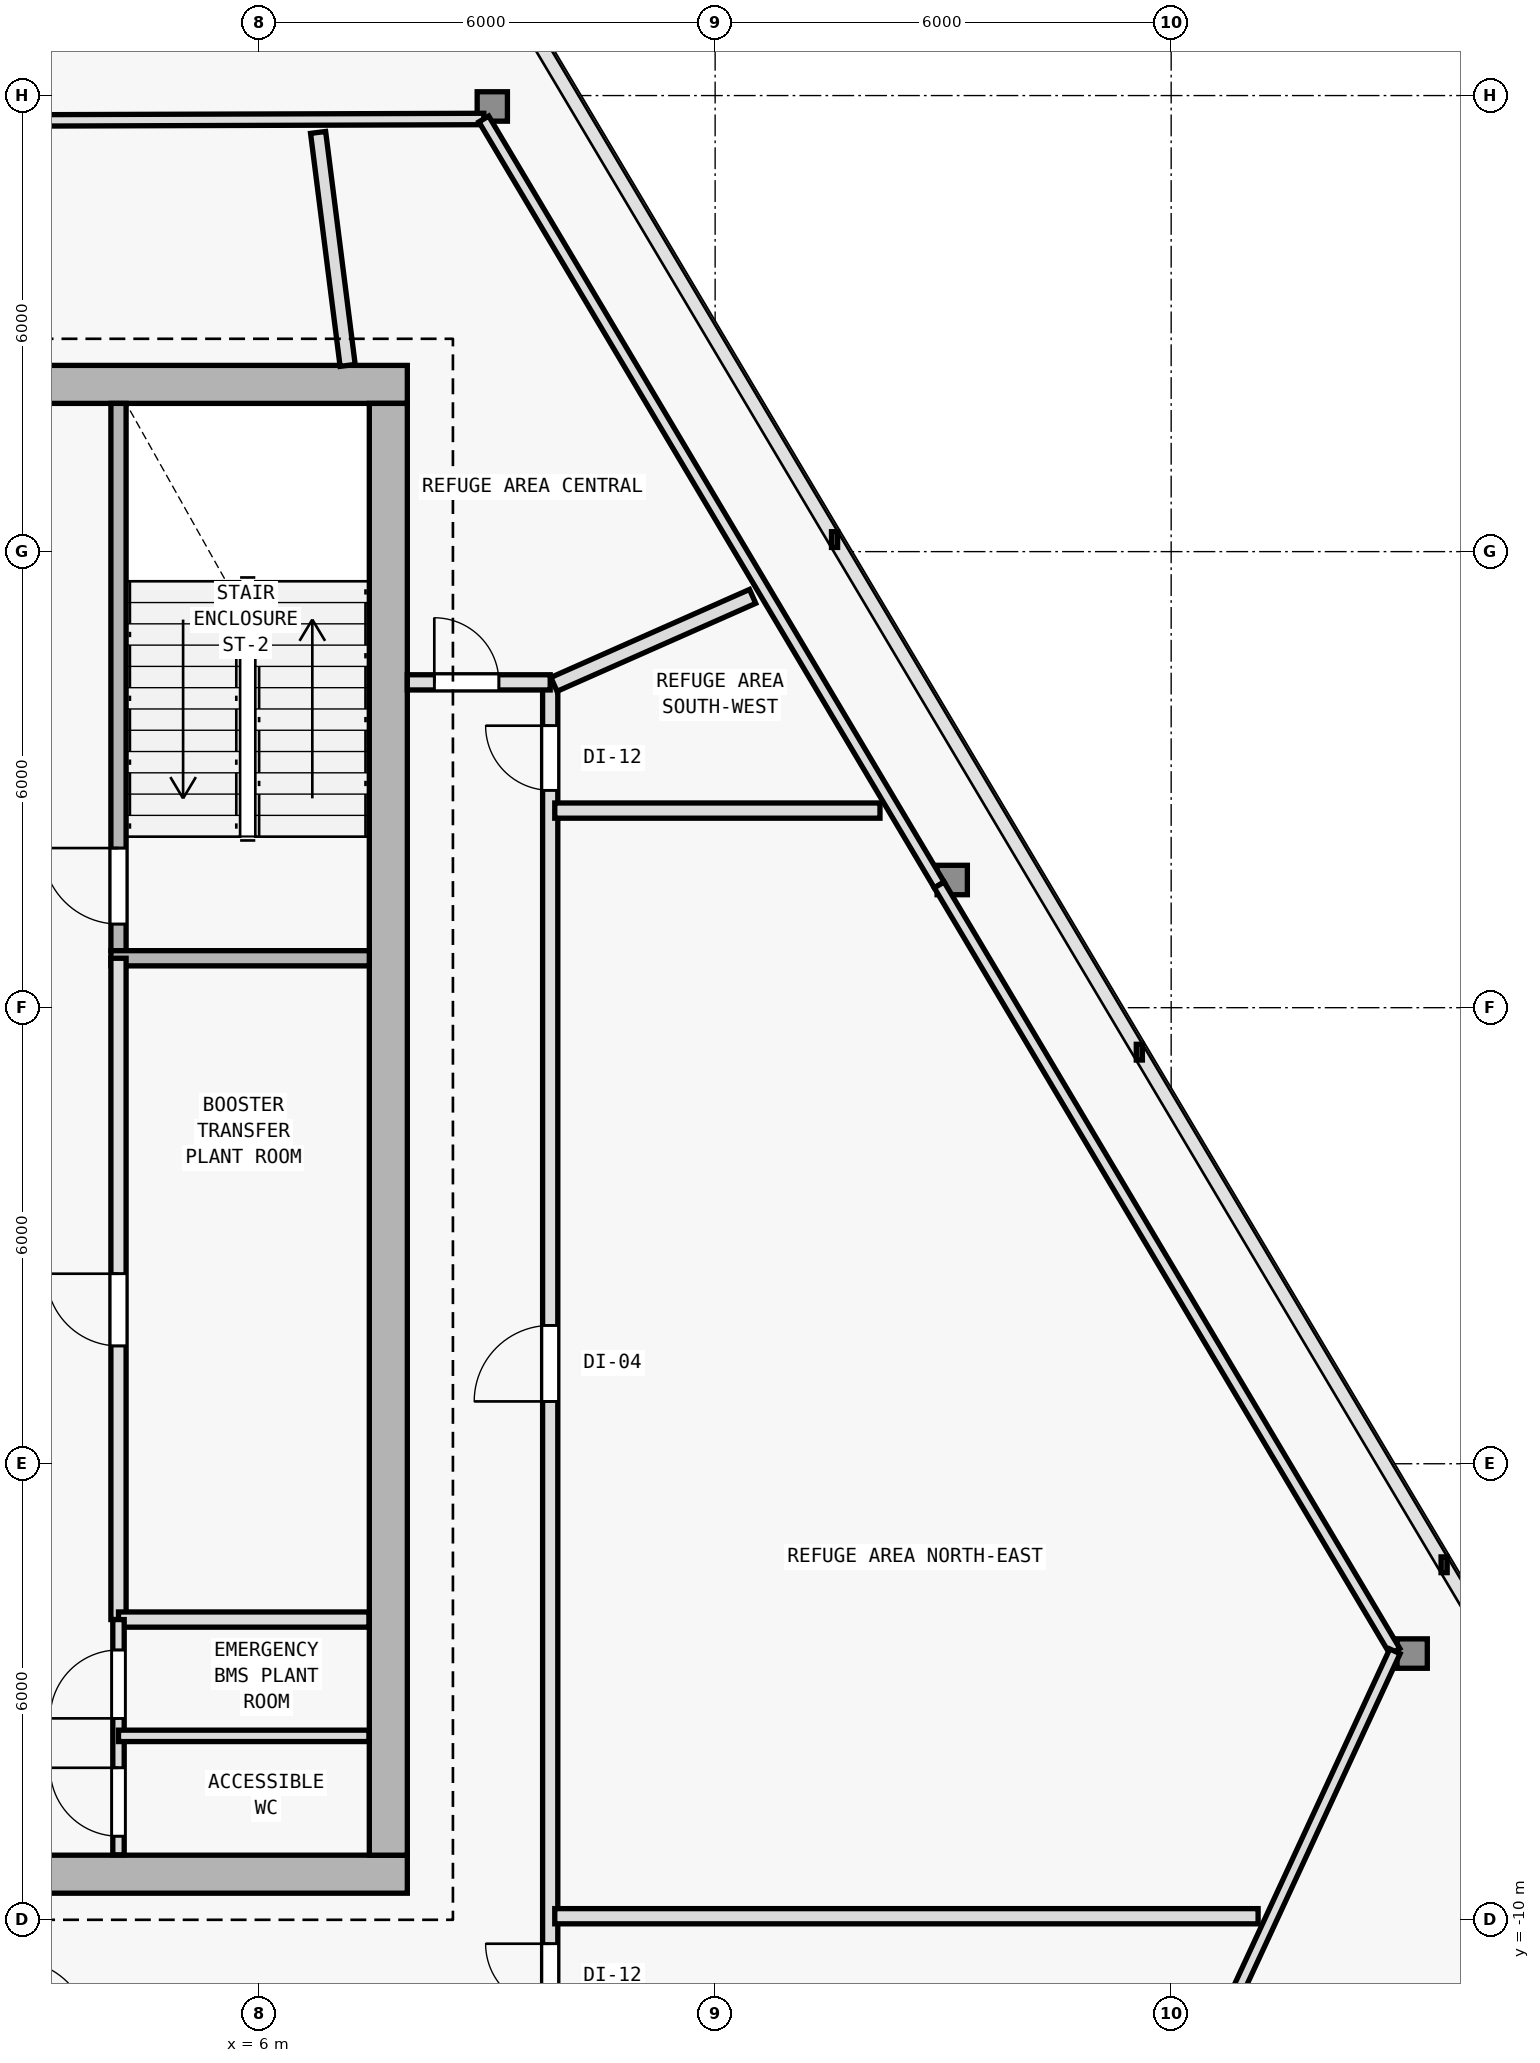
"""IFC4 building model, lengths in metres.
Left out: names, types, materials, properties, quantities, classifications, styles, units other than length and angle.
Written with IfcOpenShell. Run it as: python <this file> out.ifc"""

import sys

from ifc_helpers import new_model, si_unit, direction, frame, frame_2d, origin, origin_2d, place, context, subcontext, project, spatial, rectangle, i_section, extrude, element, fill, save


model = new_model("IFC4")
c1 = context("Model", 3, precision=1e-05, world=origin(), true_north=direction((0.0, 1.0)))
c2 = subcontext(c1, "Body", "Model", "MODEL_VIEW")
j1 = project(units=[si_unit("LENGTHUNIT", "METRE"), si_unit("PLANEANGLEUNIT", "RADIAN")], contexts=[c1])
p1 = place(None, origin())
s1 = spatial("IfcSite", under=j1, at=p1, CompositionType="ELEMENT")
p2 = place(p1, origin())
s2 = spatial("IfcBuilding", under=s1, at=p2, CompositionType="ELEMENT")
p3 = place(p2, frame((0.0, 0.0, 185.4)))
s3 = spatial("IfcBuildingStorey", under=s2, at=p3, CompositionType="ELEMENT", Elevation=185.4)
for number, where, z_axis, x_axis in (
    (1, (7.7, -9.4, 0.0), (0.0, 0.0, 1.0), (1.0, 0.0, 0.0)),
    (2, (7.7, 10.2, 0.0), (0.0, 0.0, 1.0), (1.0, 0.0, 0.0)),
    (3, (7.7, 0.4, 0.0), (0.0, 0.0, 1.0), (1.0, 0.0, 0.0)),
):
    element("IfcColumn", number, at=place(p3, frame(where, z_axis=z_axis, x_axis=x_axis)), inside=s3, PredefinedType="COLUMN", context=c2, shape_type="SweptSolid", body=[
        extrude(i_section(OverallWidth=0.404, OverallDepth=0.407, WebThickness=0.017, FlangeThickness=0.028, FilletRadius=0.015, at=origin_2d()), origin(), (0.0, 0.0, 1.0), 4.8),
    ])
p4 = place(p3, frame((21.171, -6.497, 0.006), z_axis=(-0.019518593425, 0.016206038405, 0.999678142619), x_axis=(-0.638800249892, -0.769372628015, 0.0)))
e4 = element("IfcColumn", 4, at=p4, inside=s3, PredefinedType="COLUMN", context=c2, shape_type="SweptSolid", body=[
    extrude(i_section(OverallWidth=0.398, OverallDepth=0.387, WebThickness=0.013, FlangeThickness=0.022, FilletRadius=0.015, at=origin_2d()), origin(), (0.0, 0.0, 1.0), 4.791),
])
p5 = place(p3, frame((15.12, 3.68, 0.006), z_axis=(-0.014170320574, 0.007136132663, 0.999874130891), x_axis=(-0.449781931574, -0.893138406984, 0.0)))
e5 = element("IfcColumn", 5, at=p5, inside=s3, PredefinedType="COLUMN", context=c2, shape_type="SweptSolid", body=[
    extrude(i_section(OverallWidth=0.398, OverallDepth=0.387, WebThickness=0.013, FlangeThickness=0.022, FilletRadius=0.015, at=origin_2d()), origin(), (0.0, 0.0, 1.0), 4.79),
])
p6 = place(p3, frame((9.068, 13.857, 0.006), z_axis=(-0.008818971646, -0.001937115159, 0.999959235831), x_axis=(0.214538664031, -0.976715496773, 0.0)))
e6 = element("IfcColumn", 6, at=p6, inside=s3, PredefinedType="COLUMN", context=c2, shape_type="SweptSolid", body=[
    extrude(i_section(OverallWidth=0.398, OverallDepth=0.387, WebThickness=0.013, FlangeThickness=0.022, FilletRadius=0.015, at=origin_2d()), origin(), (0.0, 0.0, 1.0), 4.789),
])
p7 = place(p3, frame((-7.95, -9.4, 0.0), z_axis=(0.0, 0.0, 1.0), x_axis=(1.0, 0.0, 0.0)))
e7 = element("IfcWall", 7, at=p7, inside=s3, PredefinedType="SHEAR", context=c2, shape_type="SweptSolid", body=[
    extrude(rectangle(XDim=15.9, YDim=0.5, at=frame_2d((7.95, 0.0))), origin(), (0.0, 0.0, 1.0), 4.5),
])
p8 = place(p7, frame((9.6, 0.0, 0.0)))
e8 = element("IfcOpeningElement", 8, at=p8, cuts=e7, PredefinedType="OPENING", context=c2, shape_type="SweptSolid", body=[
    extrude(rectangle(XDim=1.5, YDim=2.2, at=frame_2d((0.75, 1.1))), frame((0.0, 0.26, 0.0), z_axis=(0.0, -1.0, 0.0), x_axis=(1.0, 0.0, 0.0)), (0.0, 0.0, 1.0), 0.52),
])
p9 = place(p3, frame((7.95, 10.2, 0.0), z_axis=(0.0, 0.0, 1.0), x_axis=(-1.0, 0.0, 0.0)))
e9 = element("IfcWall", 9, at=p9, inside=s3, PredefinedType="SHEAR", context=c2, shape_type="SweptSolid", body=[
    extrude(rectangle(XDim=15.9, YDim=0.5, at=frame_2d((7.95, 0.0))), origin(), (0.0, 0.0, 1.0), 4.5),
])
p10 = place(p3, frame((7.7, 9.95, 0.0), z_axis=(0.0, 0.0, 1.0), x_axis=(0.0, -1.0, 0.0)))
e10 = element("IfcWall", 10, at=p10, inside=s3, PredefinedType="SHEAR", context=c2, shape_type="SweptSolid", body=[
    extrude(rectangle(XDim=19.1, YDim=0.5, at=frame_2d((9.55, 0.0))), origin(), (0.0, 0.0, 1.0), 4.5),
])
p11 = place(p3, frame((4.15, 2.75, 0.0), z_axis=(0.0, 0.0, 1.0), x_axis=(0.0, 1.0, 0.0)))
e11 = element("IfcWall", 11, at=p11, inside=s3, PredefinedType="SOLIDWALL", context=c2, shape_type="SweptSolid", body=[
    extrude(rectangle(XDim=7.2, YDim=0.2, at=frame_2d((3.6, 0.0))), origin(), (0.0, 0.0, 1.0), 4.5),
])
p12 = place(p11, frame((0.35, 0.0, 0.0)))
e12 = element("IfcOpeningElement", 12, at=p12, cuts=e11, PredefinedType="OPENING", context=c2, shape_type="SweptSolid", body=[
    extrude(rectangle(XDim=1.0, YDim=2.15, at=frame_2d((0.5, 1.075))), frame((0.0, 0.11, 0.0), z_axis=(0.0, -1.0, 0.0), x_axis=(1.0, 0.0, 0.0)), (0.0, 0.0, 1.0), 0.22),
])
p13 = place(p3, frame((4.05, 2.65, 0.0), z_axis=(0.0, 0.0, 1.0), x_axis=(1.0, 0.0, 0.0)))
e13 = element("IfcWall", 13, at=p13, inside=s3, PredefinedType="SOLIDWALL", context=c2, shape_type="SweptSolid", body=[
    extrude(rectangle(XDim=3.4, YDim=0.2, at=frame_2d((1.7, 0.0))), origin(), (0.0, 0.0, 1.0), 4.5),
])
p14 = place(p3, frame((4.15, -6.05, 0.0), z_axis=(0.0, 0.0, 1.0), x_axis=(0.0, 1.0, 0.0)))
e14 = element("IfcWall", 14, at=p14, inside=s3, PredefinedType="SOLIDWALL", context=c2, shape_type="SweptSolid", body=[
    extrude(rectangle(XDim=8.7, YDim=0.2, at=frame_2d((4.35, 0.0))), origin(), (0.0, 0.0, 1.0), 4.5),
])
p15 = place(p14, frame((3.6, 0.0, 0.0)))
e15 = element("IfcOpeningElement", 15, at=p15, cuts=e14, PredefinedType="OPENING", context=c2, shape_type="SweptSolid", body=[
    extrude(rectangle(XDim=0.95, YDim=2.1, at=frame_2d((0.475, 1.05))), frame((0.0, 0.11, 0.0), z_axis=(0.0, -1.0, 0.0), x_axis=(1.0, 0.0, 0.0)), (0.0, 0.0, 1.0), 0.22),
])
p16 = place(p3, frame((4.15, -6.05, 0.0), z_axis=(0.0, 0.0, 1.0), x_axis=(1.0, 0.0, 0.0)))
e16 = element("IfcWall", 16, at=p16, inside=s3, PredefinedType="SOLIDWALL", context=c2, shape_type="SweptSolid", body=[
    extrude(rectangle(XDim=3.295, YDim=0.2, at=frame_2d((1.647, 0.0))), origin(), (0.0, 0.0, 1.0), 4.5),
])
p17 = place(p3, frame((4.15, -9.145, 0.0), z_axis=(0.0, 0.0, 1.0), x_axis=(0.0, 1.0, 0.0)))
e17 = element("IfcWall", 17, at=p17, inside=s3, PredefinedType="PARTITIONING", context=c2, shape_type="SweptSolid", body=[
    extrude(rectangle(XDim=3.095, YDim=0.15, at=frame_2d((1.547, 0.0))), origin(), (0.0, 0.0, 1.0), 4.5),
])
p18 = place(p17, frame((0.245, 0.0, 0.0)))
e18 = element("IfcOpeningElement", 18, at=p18, cuts=e17, PredefinedType="OPENING", context=c2, shape_type="SweptSolid", body=[
    extrude(rectangle(XDim=0.9, YDim=2.1, at=frame_2d((0.45, 1.05))), frame((0.0, 0.085, 0.0), z_axis=(0.0, -1.0, 0.0), x_axis=(1.0, 0.0, 0.0)), (0.0, 0.0, 1.0), 0.17),
])
p19 = place(p17, frame((1.795, 0.0, 0.0)))
e19 = element("IfcOpeningElement", 19, at=p19, cuts=e17, PredefinedType="OPENING", context=c2, shape_type="SweptSolid", body=[
    extrude(rectangle(XDim=0.9, YDim=2.1, at=frame_2d((0.45, 1.05))), frame((0.0, 0.085, 0.0), z_axis=(0.0, -1.0, 0.0), x_axis=(1.0, 0.0, 0.0)), (0.0, 0.0, 1.0), 0.17),
])
p20 = place(p3, frame((4.15, -7.58, 0.0), z_axis=(0.0, 0.0, 1.0), x_axis=(1.0, 0.0, 0.0)))
e20 = element("IfcWall", 20, at=p20, inside=s3, PredefinedType="PARTITIONING", context=c2, shape_type="SweptSolid", body=[
    extrude(rectangle(XDim=3.295, YDim=0.15, at=frame_2d((1.647, 0.0))), origin(), (0.0, 0.0, 1.0), 4.5),
])
p21 = place(p3, frame((-6.529, 13.644, 0.0), z_axis=(0.0, 0.0, 1.0), x_axis=(0.999995127533, 0.003121683751, 0.0)))
e21 = element("IfcWall", 21, at=p21, inside=s3, PredefinedType="PARTITIONING", context=c2, shape_type="SweptSolid", body=[
    extrude(rectangle(XDim=15.485, YDim=0.15, at=frame_2d((7.743, 0.0))), origin(), (0.0, 0.0, 1.0), 4.085),
])
p22 = place(p3, frame((8.956, 13.692, 0.0), z_axis=(0.0, 0.0, 1.0), x_axis=(0.511092441112, -0.859525751004, 0.0)))
e22 = element("IfcWall", 22, at=p22, inside=s3, PredefinedType="PARTITIONING", context=c2, shape_type="SweptSolid", body=[
    extrude(rectangle(XDim=11.724, YDim=0.15, at=frame_2d((5.862, 0.0))), origin(), (0.0, 0.0, 1.0), 4.085),
])
p23 = place(p3, frame((14.948, 3.615, 0.0), z_axis=(0.0, 0.0, 1.0), x_axis=(0.511088275571, -0.85952822791, 0.0)))
e23 = element("IfcWall", 23, at=p23, inside=s3, PredefinedType="PARTITIONING", context=c2, shape_type="SweptSolid", body=[
    extrude(rectangle(XDim=11.73, YDim=0.15, at=frame_2d((5.865, 0.0))), origin(), (0.0, 0.0, 1.0), 3.975),
])
p24 = place(p3, frame((20.944, -6.468, 0.0), z_axis=(0.0, 0.0, 1.0), x_axis=(-0.419911813546, -0.907564911642, 0.0)))
e24 = element("IfcWall", 24, at=p24, inside=s3, PredefinedType="PARTITIONING", context=c2, shape_type="SweptSolid", body=[
    extrude(rectangle(XDim=9.284, YDim=0.15, at=frame_2d((4.642, 0.0))), origin(), (0.0, 0.0, 1.0), 3.975),
])
p25 = place(p3, frame((9.83, -11.53, 0.0), z_axis=(0.0, 0.0, 1.0), x_axis=(0.0, 1.0, 0.0)))
e25 = element("IfcWall", 25, at=p25, inside=s3, PredefinedType="SOLIDWALL", context=c2, shape_type="SweptSolid", body=[
    extrude(rectangle(XDim=17.81, YDim=0.2, at=frame_2d((8.905, 0.0))), origin(), (0.0, 0.0, 1.0), 3.875),
])
p26 = place(p25, frame((0.365, 0.0, 0.0)))
e26 = element("IfcOpeningElement", 26, at=p26, cuts=e25, PredefinedType="OPENING", context=c2, shape_type="SweptSolid", body=[
    extrude(rectangle(XDim=0.85, YDim=2.1, at=frame_2d((0.425, 1.05))), frame((0.0, 0.11, 0.0), z_axis=(0.0, -1.0, 0.0), x_axis=(1.0, 0.0, 0.0)), (0.0, 0.0, 1.0), 0.22),
])
p27 = place(p25, frame((8.35, 0.0, 0.0)))
e27 = element("IfcOpeningElement", 27, at=p27, cuts=e25, PredefinedType="OPENING", context=c2, shape_type="SweptSolid", body=[
    extrude(rectangle(XDim=1.0, YDim=2.15, at=frame_2d((0.5, 1.075))), frame((0.0, 0.11, 0.0), z_axis=(0.0, -1.0, 0.0), x_axis=(1.0, 0.0, 0.0)), (0.0, 0.0, 1.0), 0.22),
])
p28 = place(p25, frame((16.39, 0.0, 0.0)))
e28 = element("IfcOpeningElement", 28, at=p28, cuts=e25, PredefinedType="OPENING", context=c2, shape_type="SweptSolid", body=[
    extrude(rectangle(XDim=0.85, YDim=2.1, at=frame_2d((0.425, 1.05))), frame((0.0, 0.11, 0.0), z_axis=(0.0, -1.0, 0.0), x_axis=(1.0, 0.0, 0.0)), (0.0, 0.0, 1.0), 0.22),
])
p29 = place(p3, frame((7.95, 6.28, 0.0), z_axis=(0.0, 0.0, 1.0), x_axis=(1.0, 0.0, 0.0)))
e29 = element("IfcWall", 29, at=p29, inside=s3, PredefinedType="SOLIDWALL", context=c2, shape_type="SweptSolid", body=[
    extrude(rectangle(XDim=1.88, YDim=0.2, at=frame_2d((0.94, 0.0))), origin(), (0.0, 0.0, 1.0), 3.975),
])
p30 = place(p29, frame((0.355, 0.0, 0.0)))
e30 = element("IfcOpeningElement", 30, at=p30, cuts=e29, PredefinedType="OPENING", context=c2, shape_type="SweptSolid", body=[
    extrude(rectangle(XDim=0.85, YDim=2.1, at=frame_2d((0.425, 1.05))), frame((0.0, 0.11, 0.0), z_axis=(0.0, -1.0, 0.0), x_axis=(1.0, 0.0, 0.0)), (0.0, 0.0, 1.0), 0.22),
])
p31 = place(p3, frame((9.89, -9.953, 0.0), z_axis=(0.0, 0.0, 1.0), x_axis=(1.0, 0.0, 0.0)))
e31 = element("IfcWall", 31, at=p31, inside=s3, PredefinedType="SOLIDWALL", context=c2, shape_type="SweptSolid", body=[
    extrude(rectangle(XDim=9.254, YDim=0.2, at=frame_2d((4.627, 0.0))), origin(), (0.0, 0.0, 1.0), 4.085),
])
p32 = place(p3, frame((9.89, 4.593, 0.0), z_axis=(0.0, 0.0, 1.0), x_axis=(1.0, 0.0, 0.0)))
e32 = element("IfcWall", 32, at=p32, inside=s3, PredefinedType="SOLIDWALL", context=c2, shape_type="SweptSolid", body=[
    extrude(rectangle(XDim=4.279, YDim=0.2, at=frame_2d((2.14, 0.0))), origin(), (0.0, 0.0, 1.0), 3.975),
])
p33 = place(p3, frame((9.879, 6.253, 0.0), z_axis=(0.0, 0.0, 1.0), x_axis=(0.914370618013, 0.404878219856, 0.0)))
e33 = element("IfcWall", 33, at=p33, inside=s3, PredefinedType="SOLIDWALL", context=c2, shape_type="SweptSolid", body=[
    extrude(rectangle(XDim=2.859, YDim=0.2, at=frame_2d((1.429, 0.0))), origin(), (0.0, 0.0, 1.0), 3.975),
])
p34 = place(p3, frame((7.165, 10.45, 0.0), z_axis=(0.0, 0.0, 1.0), x_axis=(-0.125804652953, 0.992055033401, 0.0)))
e34 = element("IfcWall", 34, at=p34, inside=s3, PredefinedType="SOLIDWALL", context=c2, shape_type="SweptSolid", body=[
    extrude(rectangle(XDim=3.09, YDim=0.2, at=frame_2d((1.545, 0.0))), origin(), (0.0, 0.0, 1.0), 4.5),
])
p35 = place(p12, origin())
e35 = element("IfcDoor", 35, at=p35, inside=s3, OperationType="SINGLE_SWING_RIGHT", PredefinedType="DOOR", context=c2, shape_type="SweptSolid", body=[
    extrude(rectangle(XDim=1.0, YDim=2.15, at=frame_2d((0.5, 1.075))), frame((0.0, 0.025, 0.0), z_axis=(0.0, -1.0, 0.0), x_axis=(1.0, 0.0, 0.0)), (0.0, 0.0, 1.0), 0.05),
])
fill(e12, e35)
p36 = place(p15, origin())
e36 = element("IfcDoor", 36, at=p36, inside=s3, OperationType="SINGLE_SWING_RIGHT", PredefinedType="DOOR", context=c2, shape_type="SweptSolid", body=[
    extrude(rectangle(XDim=0.95, YDim=2.1, at=frame_2d((0.475, 1.05))), frame((0.0, 0.025, 0.0), z_axis=(0.0, -1.0, 0.0), x_axis=(1.0, 0.0, 0.0)), (0.0, 0.0, 1.0), 0.05),
])
fill(e15, e36)
p37 = place(p18, origin())
e37 = element("IfcDoor", 37, at=p37, inside=s3, OperationType="SINGLE_SWING_RIGHT", PredefinedType="DOOR", context=c2, shape_type="SweptSolid", body=[
    extrude(rectangle(XDim=0.9, YDim=2.1, at=frame_2d((0.45, 1.05))), frame((0.0, 0.025, 0.0), z_axis=(0.0, -1.0, 0.0), x_axis=(1.0, 0.0, 0.0)), (0.0, 0.0, 1.0), 0.05),
])
fill(e18, e37)
p38 = place(p19, origin())
e38 = element("IfcDoor", 38, at=p38, inside=s3, OperationType="SINGLE_SWING_LEFT", PredefinedType="DOOR", context=c2, shape_type="SweptSolid", body=[
    extrude(rectangle(XDim=0.9, YDim=2.1, at=frame_2d((0.45, 1.05))), frame((0.0, 0.025, 0.0), z_axis=(0.0, -1.0, 0.0), x_axis=(1.0, 0.0, 0.0)), (0.0, 0.0, 1.0), 0.05),
])
fill(e19, e38)
p39 = place(p26, origin())
e39 = element("IfcDoor", 39, at=p39, inside=s3, OperationType="SINGLE_SWING_RIGHT", PredefinedType="DOOR", context=c2, shape_type="SweptSolid", body=[
    extrude(rectangle(XDim=0.85, YDim=2.1, at=frame_2d((0.425, 1.05))), frame((0.0, 0.025, 0.0), z_axis=(0.0, -1.0, 0.0), x_axis=(1.0, 0.0, 0.0)), (0.0, 0.0, 1.0), 0.05),
])
fill(e26, e39)
p40 = place(p27, origin())
e40 = element("IfcDoor", 40, at=p40, inside=s3, OperationType="SINGLE_SWING_LEFT", PredefinedType="DOOR", context=c2, shape_type="SweptSolid", body=[
    extrude(rectangle(XDim=1.0, YDim=2.15, at=frame_2d((0.5, 1.075))), frame((0.0, 0.025, 0.0), z_axis=(0.0, -1.0, 0.0), x_axis=(1.0, 0.0, 0.0)), (0.0, 0.0, 1.0), 0.05),
])
fill(e27, e40)
p41 = place(p28, origin())
e41 = element("IfcDoor", 41, at=p41, inside=s3, OperationType="SINGLE_SWING_RIGHT", PredefinedType="DOOR", context=c2, shape_type="SweptSolid", body=[
    extrude(rectangle(XDim=0.85, YDim=2.1, at=frame_2d((0.425, 1.05))), frame((0.0, 0.025, 0.0), z_axis=(0.0, -1.0, 0.0), x_axis=(1.0, 0.0, 0.0)), (0.0, 0.0, 1.0), 0.05),
])
fill(e28, e41)
p42 = place(p30, origin())
e42 = element("IfcDoor", 42, at=p42, inside=s3, OperationType="SINGLE_SWING_LEFT", PredefinedType="DOOR", context=c2, shape_type="SweptSolid", body=[
    extrude(rectangle(XDim=0.85, YDim=2.1, at=frame_2d((0.425, 1.05))), frame((0.0, 0.025, 0.0), z_axis=(0.0, -1.0, 0.0), x_axis=(1.0, 0.0, 0.0)), (0.0, 0.0, 1.0), 0.05),
])
fill(e30, e42)
save(model, sys.argv[1])
